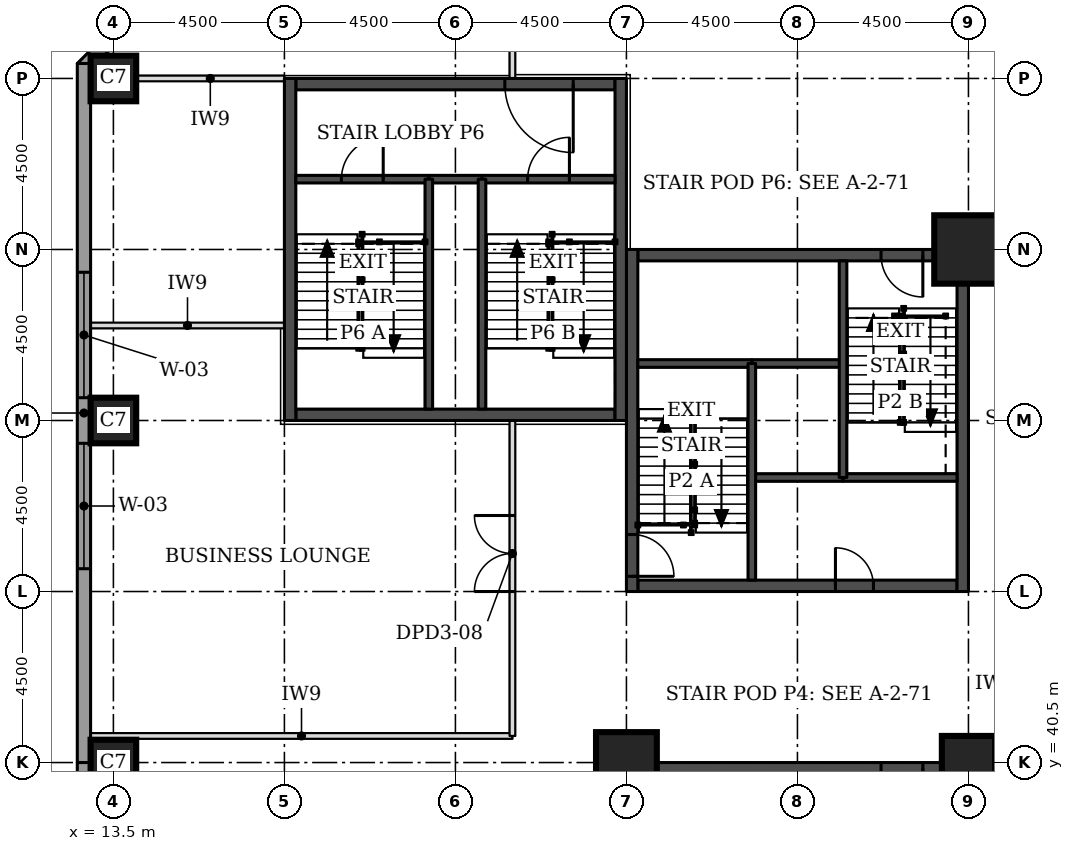
"""IFC4 building model, lengths in metres.
Left out: names, types, materials, properties, quantities, classifications, styles, units other than length and angle.
Written with IfcOpenShell. Run it as: python <this file> out.ifc"""

import sys

from ifc_helpers import new_model, si_unit, direction, frame, frame_2d, origin, origin_2d, place, context, subcontext, project, spatial, rectangle, extrude, element, fill, save


model = new_model("IFC4")
c1 = context("Model", 3, precision=1e-05, world=origin(), true_north=direction((0.0, 1.0)))
c2 = subcontext(c1, "Body", "Model", "MODEL_VIEW")
j1 = project(units=[si_unit("LENGTHUNIT", "METRE"), si_unit("PLANEANGLEUNIT", "RADIAN")], contexts=[c1])
p1 = place(None, origin())
s1 = spatial("IfcSite", under=j1, at=p1, CompositionType="ELEMENT")
p2 = place(p1, origin())
s2 = spatial("IfcBuilding", under=s1, at=p2, CompositionType="ELEMENT")
p3 = place(p2, frame((0.0, 0.0, 18.5)))
s3 = spatial("IfcBuildingStorey", under=s2, at=p3, CompositionType="ELEMENT", Elevation=18.5)
p4 = place(p3, frame((13.5, 40.5, 0.0), z_axis=(0.0, 0.0, 1.0), x_axis=(1.0, 0.0, 0.0)))
e1 = element("IfcColumn", 1, at=p4, inside=s3, PredefinedType="COLUMN", context=c2, shape_type="SweptSolid", body=[
    extrude(rectangle(XDim=1.2, YDim=1.2, at=origin_2d()), origin(), (0.0, 0.0, 1.0), 4.6),
])
p5 = place(p3, frame((27.0, 40.5, 0.0), z_axis=(0.0, 0.0, 1.0), x_axis=(1.0, 0.0, 0.0)))
e2 = element("IfcColumn", 2, at=p5, inside=s3, PredefinedType="COLUMN", context=c2, shape_type="SweptSolid", body=[
    extrude(rectangle(XDim=1.6, YDim=1.6, at=origin_2d()), origin(), (0.0, 0.0, 1.0), 4.6),
])
p6 = place(p3, frame((36.0, 40.5, 0.0), z_axis=(0.0, 0.0, 1.0), x_axis=(1.0, 0.0, 0.0)))
e3 = element("IfcColumn", 3, at=p6, inside=s3, PredefinedType="COLUMN", context=c2, shape_type="SweptSolid", body=[
    extrude(rectangle(XDim=1.4, YDim=1.4, at=origin_2d()), origin(), (0.0, 0.0, 1.0), 4.6),
])
p7 = place(p3, frame((13.5, 49.5, 0.0), z_axis=(0.0, 0.0, 1.0), x_axis=(1.0, 0.0, 0.0)))
e4 = element("IfcColumn", 4, at=p7, inside=s3, PredefinedType="COLUMN", context=c2, shape_type="SweptSolid", body=[
    extrude(rectangle(XDim=1.2, YDim=1.2, at=origin_2d()), origin(), (0.0, 0.0, 1.0), 4.6),
])
p8 = place(p3, frame((36.0, 54.0, 0.0), z_axis=(0.0, 0.0, 1.0), x_axis=(1.0, 0.0, 0.0)))
e5 = element("IfcColumn", 5, at=p8, inside=s3, PredefinedType="COLUMN", context=c2, shape_type="SweptSolid", body=[
    extrude(rectangle(XDim=1.8, YDim=1.8, at=origin_2d()), origin(), (0.0, 0.0, 1.0), 4.6),
])
p9 = place(p3, frame((13.5, 58.5, 0.0), z_axis=(0.0, 0.0, 1.0), x_axis=(1.0, 0.0, 0.0)))
e6 = element("IfcColumn", 6, at=p9, inside=s3, PredefinedType="COLUMN", context=c2, shape_type="SweptSolid", body=[
    extrude(rectangle(XDim=1.2, YDim=1.2, at=origin_2d()), origin(), (0.0, 0.0, 1.0), 4.6),
])
p10 = place(p3, frame((27.3, 45.15, 0.0), z_axis=(0.0, 0.0, 1.0), x_axis=(1.0, 0.0, 0.0)))
e7 = element("IfcWall", 7, at=p10, inside=s3, PredefinedType="SHEAR", context=c2, shape_type="SweptSolid", body=[
    extrude(rectangle(XDim=8.4, YDim=0.3, at=frame_2d((4.2, 0.0))), origin(), (0.0, 0.0, 1.0), 4.6),
])
p11 = place(p10, frame((5.2, 0.0, 0.0)))
e8 = element("IfcOpeningElement", 8, at=p11, cuts=e7, PredefinedType="OPENING", context=c2, shape_type="SweptSolid", body=[
    extrude(rectangle(XDim=1.0, YDim=2.1, at=frame_2d((0.5, 1.05))), frame((0.0, 0.16, 0.0), z_axis=(0.0, -1.0, 0.0), x_axis=(1.0, 0.0, 0.0)), (0.0, 0.0, 1.0), 0.32),
])
p12 = place(p3, frame((27.3, 53.85, 0.0), z_axis=(0.0, 0.0, 1.0), x_axis=(1.0, 0.0, 0.0)))
e9 = element("IfcWall", 9, at=p12, inside=s3, PredefinedType="SHEAR", context=c2, shape_type="SweptSolid", body=[
    extrude(rectangle(XDim=8.4, YDim=0.3, at=frame_2d((4.2, 0.0))), origin(), (0.0, 0.0, 1.0), 4.6),
])
p13 = place(p12, frame((6.4, 0.0, 0.0)))
e10 = element("IfcOpeningElement", 10, at=p13, cuts=e9, PredefinedType="OPENING", context=c2, shape_type="SweptSolid", body=[
    extrude(rectangle(XDim=1.1, YDim=2.1, at=frame_2d((0.55, 1.05))), frame((0.0, 0.16, 0.0), z_axis=(0.0, -1.0, 0.0), x_axis=(1.0, 0.0, 0.0)), (0.0, 0.0, 1.0), 0.32),
])
p14 = place(p3, frame((27.15, 45.0, 0.0), z_axis=(0.0, 0.0, 1.0), x_axis=(0.0, 1.0, 0.0)))
e11 = element("IfcWall", 11, at=p14, inside=s3, PredefinedType="SHEAR", context=c2, shape_type="SweptSolid", body=[
    extrude(rectangle(XDim=9.0, YDim=0.3, at=frame_2d((4.5, 0.0))), origin(), (0.0, 0.0, 1.0), 4.6),
])
p15 = place(p14, frame((0.4, 0.0, 0.0)))
e12 = element("IfcOpeningElement", 12, at=p15, cuts=e11, PredefinedType="OPENING", context=c2, shape_type="SweptSolid", body=[
    extrude(rectangle(XDim=1.1, YDim=2.1, at=frame_2d((0.55, 1.05))), frame((0.0, 0.16, 0.0), z_axis=(0.0, -1.0, 0.0), x_axis=(1.0, 0.0, 0.0)), (0.0, 0.0, 1.0), 0.32),
])
p16 = place(p3, frame((35.85, 45.0, 0.0), z_axis=(0.0, 0.0, 1.0), x_axis=(0.0, 1.0, 0.0)))
e13 = element("IfcWall", 13, at=p16, inside=s3, PredefinedType="SHEAR", context=c2, shape_type="SweptSolid", body=[
    extrude(rectangle(XDim=9.0, YDim=0.3, at=frame_2d((4.5, 0.0))), origin(), (0.0, 0.0, 1.0), 4.6),
])
p17 = place(p3, frame((27.3, 40.35, 0.0), z_axis=(0.0, 0.0, 1.0), x_axis=(1.0, 0.0, 0.0)))
e14 = element("IfcWall", 14, at=p17, inside=s3, PredefinedType="SHEAR", context=c2, shape_type="SweptSolid", body=[
    extrude(rectangle(XDim=8.4, YDim=0.3, at=frame_2d((4.2, 0.0))), origin(), (0.0, 0.0, 1.0), 4.6),
])
p18 = place(p17, frame((6.4, 0.0, 0.0)))
e15 = element("IfcOpeningElement", 15, at=p18, cuts=e14, PredefinedType="OPENING", context=c2, shape_type="SweptSolid", body=[
    extrude(rectangle(XDim=1.1, YDim=2.1, at=frame_2d((0.55, 1.05))), frame((0.0, 0.16, 0.0), z_axis=(0.0, -1.0, 0.0), x_axis=(1.0, 0.0, 0.0)), (0.0, 0.0, 1.0), 0.32),
])
p19 = place(p3, frame((27.15, 31.5, 0.0), z_axis=(0.0, 0.0, 1.0), x_axis=(0.0, 1.0, 0.0)))
e16 = element("IfcWall", 16, at=p19, inside=s3, PredefinedType="SHEAR", context=c2, shape_type="SweptSolid", body=[
    extrude(rectangle(XDim=9.0, YDim=0.3, at=frame_2d((4.5, 0.0))), origin(), (0.0, 0.0, 1.0), 4.6),
])
p20 = place(p19, frame((0.4, 0.0, 0.0)))
e17 = element("IfcOpeningElement", 17, at=p20, cuts=e16, PredefinedType="OPENING", context=c2, shape_type="SweptSolid", body=[
    extrude(rectangle(XDim=1.1, YDim=2.1, at=frame_2d((0.55, 1.05))), frame((0.0, 0.16, 0.0), z_axis=(0.0, -1.0, 0.0), x_axis=(1.0, 0.0, 0.0)), (0.0, 0.0, 1.0), 0.32),
])
p21 = place(p3, frame((35.85, 31.5, 0.0), z_axis=(0.0, 0.0, 1.0), x_axis=(0.0, 1.0, 0.0)))
e18 = element("IfcWall", 18, at=p21, inside=s3, PredefinedType="SHEAR", context=c2, shape_type="SweptSolid", body=[
    extrude(rectangle(XDim=9.0, YDim=0.3, at=frame_2d((4.5, 0.0))), origin(), (0.0, 0.0, 1.0), 4.6),
])
p22 = place(p3, frame((18.3, 49.65, 0.0), z_axis=(0.0, 0.0, 1.0), x_axis=(1.0, 0.0, 0.0)))
e19 = element("IfcWall", 19, at=p22, inside=s3, PredefinedType="SHEAR", context=c2, shape_type="SweptSolid", body=[
    extrude(rectangle(XDim=8.4, YDim=0.3, at=frame_2d((4.2, 0.0))), origin(), (0.0, 0.0, 1.0), 4.6),
])
p23 = place(p3, frame((18.3, 58.35, 0.0), z_axis=(0.0, 0.0, 1.0), x_axis=(1.0, 0.0, 0.0)))
e20 = element("IfcWall", 20, at=p23, inside=s3, PredefinedType="SHEAR", context=c2, shape_type="SweptSolid", body=[
    extrude(rectangle(XDim=8.4, YDim=0.3, at=frame_2d((4.2, 0.0))), origin(), (0.0, 0.0, 1.0), 4.6),
])
p24 = place(p23, frame((5.5, 0.0, 0.0)))
e21 = element("IfcOpeningElement", 21, at=p24, cuts=e20, PredefinedType="OPENING", context=c2, shape_type="SweptSolid", body=[
    extrude(rectangle(XDim=1.8, YDim=2.1, at=frame_2d((0.9, 1.05))), frame((0.0, 0.16, 0.0), z_axis=(0.0, -1.0, 0.0), x_axis=(1.0, 0.0, 0.0)), (0.0, 0.0, 1.0), 0.32),
])
for number, where, z_axis, x_axis in (
    (22, (18.15, 49.5, 0.0), (0.0, 0.0, 1.0), (0.0, 1.0, 0.0)),
    (23, (26.85, 49.5, 0.0), (0.0, 0.0, 1.0), (0.0, 1.0, 0.0)),
):
    element("IfcWall", number, at=place(p3, frame(where, z_axis=z_axis, x_axis=x_axis)), inside=s3, PredefinedType="SHEAR", context=c2, shape_type="SweptSolid", body=[
        extrude(rectangle(XDim=9.0, YDim=0.3, at=frame_2d((4.5, 0.0))), origin(), (0.0, 0.0, 1.0), 4.6),
    ])
p25 = place(p3, frame((17.73, 63.826, 0.0), z_axis=(0.0, 0.0, 1.0), x_axis=(-0.707106781187, -0.707106781187, 0.0)))
e24 = element("IfcWall", 24, at=p25, inside=s3, PredefinedType="STANDARD", context=c2, shape_type="SweptSolid", body=[
    extrude(rectangle(XDim=7.151, YDim=0.35, at=frame_2d((3.576, 0.0))), origin(), (0.0, 0.0, 1.0), 4.355),
])
p26 = place(p25, frame((1.926, 0.0, 0.9)))
e25 = element("IfcOpeningElement", 25, at=p26, cuts=e24, PredefinedType="OPENING", context=c2, shape_type="SweptSolid", body=[
    extrude(rectangle(XDim=3.3, YDim=2.7, at=frame_2d((1.65, 1.35))), frame((0.0, 0.185, 0.0), z_axis=(0.0, -1.0, 0.0), x_axis=(1.0, 0.0, 0.0)), (0.0, 0.0, 1.0), 0.37),
])
p27 = place(p3, frame((12.725, 58.894, 0.0), z_axis=(0.0, 0.0, 1.0), x_axis=(0.0, -1.0, 0.0)))
e26 = element("IfcWall", 26, at=p27, inside=s3, PredefinedType="STANDARD", context=c2, shape_type="SweptSolid", body=[
    extrude(rectangle(XDim=18.394, YDim=0.35, at=frame_2d((9.197, 0.0))), origin(), (0.0, 0.0, 1.0), 4.355),
])
p28 = place(p27, frame((5.493, 0.0, 0.9)))
e27 = element("IfcOpeningElement", 27, at=p28, cuts=e26, PredefinedType="OPENING", context=c2, shape_type="SweptSolid", body=[
    extrude(rectangle(XDim=3.3, YDim=2.7, at=frame_2d((1.65, 1.35))), frame((0.0, 0.185, 0.0), z_axis=(0.0, -1.0, 0.0), x_axis=(1.0, 0.0, 0.0)), (0.0, 0.0, 1.0), 0.37),
])
p29 = place(p27, frame((9.993, 0.0, 0.9)))
e28 = element("IfcOpeningElement", 28, at=p29, cuts=e26, PredefinedType="OPENING", context=c2, shape_type="SweptSolid", body=[
    extrude(rectangle(XDim=3.3, YDim=2.7, at=frame_2d((1.65, 1.35))), frame((0.0, 0.185, 0.0), z_axis=(0.0, -1.0, 0.0), x_axis=(1.0, 0.0, 0.0)), (0.0, 0.0, 1.0), 0.37),
])
p30 = place(p3, frame((12.725, 40.5, 0.0), z_axis=(0.0, 0.0, 1.0), x_axis=(0.0, -1.0, 0.0)))
e29 = element("IfcWall", 29, at=p30, inside=s3, PredefinedType="STANDARD", context=c2, shape_type="SweptSolid", body=[
    extrude(rectangle(XDim=18.394, YDim=0.35, at=frame_2d((9.197, 0.0))), origin(), (0.0, 0.0, 1.0), 4.355),
])
p31 = place(p30, frame((5.1, 0.0, 0.9)))
e30 = element("IfcOpeningElement", 30, at=p31, cuts=e29, PredefinedType="OPENING", context=c2, shape_type="SweptSolid", body=[
    extrude(rectangle(XDim=3.3, YDim=2.7, at=frame_2d((1.65, 1.35))), frame((0.0, 0.185, 0.0), z_axis=(0.0, -1.0, 0.0), x_axis=(1.0, 0.0, 0.0)), (0.0, 0.0, 1.0), 0.37),
])
p32 = place(p30, frame((9.6, 0.0, 0.9)))
e31 = element("IfcOpeningElement", 31, at=p32, cuts=e29, PredefinedType="OPENING", context=c2, shape_type="SweptSolid", body=[
    extrude(rectangle(XDim=3.3, YDim=2.7, at=frame_2d((1.65, 1.35))), frame((0.0, 0.185, 0.0), z_axis=(0.0, -1.0, 0.0), x_axis=(1.0, 0.0, 0.0)), (0.0, 0.0, 1.0), 0.37),
])
p33 = place(p3, frame((12.9, 41.2, 0.0), z_axis=(0.0, 0.0, 1.0), x_axis=(1.0, 0.0, 0.0)))
e32 = element("IfcWall", 32, at=p33, inside=s3, PredefinedType="PARTITIONING", context=c2, shape_type="SweptSolid", body=[
    extrude(rectangle(XDim=11.1, YDim=0.15, at=frame_2d((5.55, 0.0))), origin(), (0.0, 0.0, 1.0), 4.38),
])
p34 = place(p3, frame((24.0, 41.2, 0.0), z_axis=(0.0, 0.0, 1.0), x_axis=(0.0, 1.0, 0.0)))
e33 = element("IfcWall", 33, at=p34, inside=s3, PredefinedType="PARTITIONING", context=c2, shape_type="SweptSolid", body=[
    extrude(rectangle(XDim=8.3, YDim=0.15, at=frame_2d((4.15, 0.0))), origin(), (0.0, 0.0, 1.0), 4.38),
])
p35 = place(p34, frame((3.8, 0.0, 0.0)))
e34 = element("IfcOpeningElement", 34, at=p35, cuts=e33, PredefinedType="OPENING", context=c2, shape_type="SweptSolid", body=[
    extrude(rectangle(XDim=2.0, YDim=2.1, at=frame_2d((1.0, 1.05))), frame((0.0, 0.085, 0.0), z_axis=(0.0, -1.0, 0.0), x_axis=(1.0, 0.0, 0.0)), (0.0, 0.0, 1.0), 0.17),
])
p36 = place(p3, frame((12.9, 52.0, 0.0), z_axis=(0.0, 0.0, 1.0), x_axis=(1.0, 0.0, 0.0)))
e35 = element("IfcWall", 35, at=p36, inside=s3, PredefinedType="PARTITIONING", context=c2, shape_type="SweptSolid", body=[
    extrude(rectangle(XDim=5.1, YDim=0.15, at=frame_2d((2.55, 0.0))), origin(), (0.0, 0.0, 1.0), 4.38),
])
p37 = place(p3, frame((14.1, 58.5, 0.0), z_axis=(0.0, 0.0, 1.0), x_axis=(1.0, 0.0, 0.0)))
e36 = element("IfcWall", 36, at=p37, inside=s3, PredefinedType="PARTITIONING", context=c2, shape_type="SweptSolid", body=[
    extrude(rectangle(XDim=3.9, YDim=0.15, at=frame_2d((1.95, 0.0))), origin(), (0.0, 0.0, 1.0), 4.38),
])
p38 = place(p3, frame((24.0, 58.5, 0.0), z_axis=(0.0, 0.0, 1.0), x_axis=(0.0, 1.0, 0.0)))
e37 = element("IfcWall", 37, at=p38, inside=s3, PredefinedType="PARTITIONING", context=c2, shape_type="SweptSolid", body=[
    extrude(rectangle(XDim=5.1, YDim=0.15, at=frame_2d((2.55, 0.0))), origin(), (0.0, 0.0, 1.0), 4.38),
])
p39 = place(p38, frame((2.0, 0.0, 0.0)))
e38 = element("IfcOpeningElement", 38, at=p39, cuts=e37, PredefinedType="OPENING", context=c2, shape_type="SweptSolid", body=[
    extrude(rectangle(XDim=1.0, YDim=2.1, at=frame_2d((0.5, 1.05))), frame((0.0, 0.085, 0.0), z_axis=(0.0, -1.0, 0.0), x_axis=(1.0, 0.0, 0.0)), (0.0, 0.0, 1.0), 0.17),
])
p40 = place(p3, frame((30.3, 48.0, 0.0), z_axis=(0.0, 0.0, 1.0), x_axis=(1.0, 0.0, 0.0)))
e39 = element("IfcWall", 39, at=p40, inside=s3, PredefinedType="SOLIDWALL", context=c2, shape_type="SweptSolid", body=[
    extrude(rectangle(XDim=2.4, YDim=0.2, at=frame_2d((1.2, 0.0))), origin(), (0.0, 0.0, 1.0), 4.38),
])
p41 = place(p3, frame((32.7, 48.0, 0.0), z_axis=(0.0, 0.0, 1.0), x_axis=(1.0, 0.0, 0.0)))
e40 = element("IfcWall", 40, at=p41, inside=s3, PredefinedType="SOLIDWALL", context=c2, shape_type="SweptSolid", body=[
    extrude(rectangle(XDim=3.0, YDim=0.2, at=frame_2d((1.5, 0.0))), origin(), (0.0, 0.0, 1.0), 4.38),
])
p42 = place(p3, frame((30.3, 51.0, 0.0), z_axis=(0.0, 0.0, 1.0), x_axis=(1.0, 0.0, 0.0)))
e41 = element("IfcWall", 41, at=p42, inside=s3, PredefinedType="SOLIDWALL", context=c2, shape_type="SweptSolid", body=[
    extrude(rectangle(XDim=2.4, YDim=0.2, at=frame_2d((1.2, 0.0))), origin(), (0.0, 0.0, 1.0), 4.6),
])
p43 = place(p3, frame((27.3, 51.0, 0.0), z_axis=(0.0, 0.0, 1.0), x_axis=(1.0, 0.0, 0.0)))
e42 = element("IfcWall", 42, at=p43, inside=s3, PredefinedType="SOLIDWALL", context=c2, shape_type="SweptSolid", body=[
    extrude(rectangle(XDim=3.0, YDim=0.2, at=frame_2d((1.5, 0.0))), origin(), (0.0, 0.0, 1.0), 4.38),
])
for number, where, z_axis, x_axis in (
    (43, (30.3, 45.3, 0.0), (0.0, 0.0, 1.0), (0.0, 1.0, 0.0)),
    (44, (32.7, 48.0, 0.0), (0.0, 0.0, 1.0), (0.0, 1.0, 0.0)),
):
    element("IfcWall", number, at=place(p3, frame(where, z_axis=z_axis, x_axis=x_axis)), inside=s3, PredefinedType="SOLIDWALL", context=c2, shape_type="SweptSolid", body=[
        extrude(rectangle(XDim=5.7, YDim=0.2, at=frame_2d((2.85, 0.0))), origin(), (0.0, 0.0, 1.0), 4.38),
    ])
p44 = place(p3, frame((21.8, 55.85, 0.0), z_axis=(0.0, 0.0, 1.0), x_axis=(1.0, 0.0, 0.0)))
e45 = element("IfcWall", 45, at=p44, inside=s3, PredefinedType="SOLIDWALL", context=c2, shape_type="SweptSolid", body=[
    extrude(rectangle(XDim=1.4, YDim=0.2, at=frame_2d((0.7, 0.0))), origin(), (0.0, 0.0, 1.0), 4.38),
])
p45 = place(p3, frame((18.3, 55.85, 0.0), z_axis=(0.0, 0.0, 1.0), x_axis=(1.0, 0.0, 0.0)))
e46 = element("IfcWall", 46, at=p45, inside=s3, PredefinedType="SOLIDWALL", context=c2, shape_type="SweptSolid", body=[
    extrude(rectangle(XDim=3.5, YDim=0.2, at=frame_2d((1.75, 0.0))), origin(), (0.0, 0.0, 1.0), 4.38),
])
p46 = place(p45, frame((1.2, 0.0, 0.0)))
e47 = element("IfcOpeningElement", 47, at=p46, cuts=e46, PredefinedType="OPENING", context=c2, shape_type="SweptSolid", body=[
    extrude(rectangle(XDim=1.1, YDim=2.1, at=frame_2d((0.55, 1.05))), frame((0.0, 0.11, 0.0), z_axis=(0.0, -1.0, 0.0), x_axis=(1.0, 0.0, 0.0)), (0.0, 0.0, 1.0), 0.22),
])
p47 = place(p3, frame((23.2, 55.85, 0.0), z_axis=(0.0, 0.0, 1.0), x_axis=(1.0, 0.0, 0.0)))
e48 = element("IfcWall", 48, at=p47, inside=s3, PredefinedType="SOLIDWALL", context=c2, shape_type="SweptSolid", body=[
    extrude(rectangle(XDim=3.5, YDim=0.2, at=frame_2d((1.75, 0.0))), origin(), (0.0, 0.0, 1.0), 4.38),
])
p48 = place(p47, frame((1.2, 0.0, 0.0)))
e49 = element("IfcOpeningElement", 49, at=p48, cuts=e48, PredefinedType="OPENING", context=c2, shape_type="SweptSolid", body=[
    extrude(rectangle(XDim=1.1, YDim=2.1, at=frame_2d((0.55, 1.05))), frame((0.0, 0.11, 0.0), z_axis=(0.0, -1.0, 0.0), x_axis=(1.0, 0.0, 0.0)), (0.0, 0.0, 1.0), 0.22),
])
for number, where, z_axis, x_axis in (
    (50, (21.8, 49.8, 0.0), (0.0, 0.0, 1.0), (0.0, 1.0, 0.0)),
    (51, (23.2, 49.8, 0.0), (0.0, 0.0, 1.0), (0.0, 1.0, 0.0)),
):
    element("IfcWall", number, at=place(p3, frame(where, z_axis=z_axis, x_axis=x_axis)), inside=s3, PredefinedType="SOLIDWALL", context=c2, shape_type="SweptSolid", body=[
        extrude(rectangle(XDim=6.05, YDim=0.2, at=frame_2d((3.025, 0.0))), origin(), (0.0, 0.0, 1.0), 4.38),
    ])
p49 = place(p28, origin())
e52 = element("IfcWindow", 52, at=p49, inside=s3, PartitioningType="SINGLE_PANEL", PredefinedType="WINDOW", context=c2, shape_type="SweptSolid", body=[
    extrude(rectangle(XDim=3.3, YDim=2.7, at=frame_2d((1.65, 1.35))), frame((0.0, 0.085, 0.0), z_axis=(0.0, -1.0, 0.0), x_axis=(1.0, 0.0, 0.0)), (0.0, 0.0, 1.0), 0.06),
])
fill(e27, e52)
p50 = place(p29, origin())
e53 = element("IfcWindow", 53, at=p50, inside=s3, PartitioningType="SINGLE_PANEL", PredefinedType="WINDOW", context=c2, shape_type="SweptSolid", body=[
    extrude(rectangle(XDim=3.3, YDim=2.7, at=frame_2d((1.65, 1.35))), frame((0.0, 0.085, 0.0), z_axis=(0.0, -1.0, 0.0), x_axis=(1.0, 0.0, 0.0)), (0.0, 0.0, 1.0), 0.06),
])
fill(e28, e53)
p51 = place(p35, origin())
e54 = element("IfcDoor", 54, at=p51, inside=s3, OperationType="DOUBLE_DOOR_SINGLE_SWING", PredefinedType="DOOR", context=c2, shape_type="SweptSolid", body=[
    extrude(rectangle(XDim=2.0, YDim=2.1, at=frame_2d((1.0, 1.05))), frame((0.0, 0.025, 0.0), z_axis=(0.0, -1.0, 0.0), x_axis=(1.0, 0.0, 0.0)), (0.0, 0.0, 1.0), 0.05),
])
fill(e34, e54)
p52 = place(p15, frame((1.1, 0.0, 0.0), z_axis=(0.0, 0.0, 1.0), x_axis=(-1.0, 0.0, 0.0)))
e55 = element("IfcDoor", 55, at=p52, inside=s3, OperationType="SINGLE_SWING_RIGHT", PredefinedType="DOOR", context=c2, shape_type="SweptSolid", body=[
    extrude(rectangle(XDim=1.1, YDim=2.1, at=frame_2d((0.55, 1.05))), frame((0.0, 0.025, 0.0), z_axis=(0.0, -1.0, 0.0), x_axis=(1.0, 0.0, 0.0)), (0.0, 0.0, 1.0), 0.05),
])
fill(e12, e55)
p53 = place(p13, frame((1.1, 0.0, 0.0), z_axis=(0.0, 0.0, 1.0), x_axis=(-1.0, 0.0, 0.0)))
e56 = element("IfcDoor", 56, at=p53, inside=s3, OperationType="SINGLE_SWING_LEFT", PredefinedType="DOOR", context=c2, shape_type="SweptSolid", body=[
    extrude(rectangle(XDim=1.1, YDim=2.1, at=frame_2d((0.55, 1.05))), frame((0.0, 0.025, 0.0), z_axis=(0.0, -1.0, 0.0), x_axis=(1.0, 0.0, 0.0)), (0.0, 0.0, 1.0), 0.05),
])
fill(e10, e56)
p54 = place(p11, origin())
e57 = element("IfcDoor", 57, at=p54, inside=s3, OperationType="SINGLE_SWING_LEFT", PredefinedType="DOOR", context=c2, shape_type="SweptSolid", body=[
    extrude(rectangle(XDim=1.0, YDim=2.1, at=frame_2d((0.5, 1.05))), frame((0.0, 0.025, 0.0), z_axis=(0.0, -1.0, 0.0), x_axis=(1.0, 0.0, 0.0)), (0.0, 0.0, 1.0), 0.05),
])
fill(e8, e57)
p55 = place(p18, frame((1.1, 0.0, 0.0), z_axis=(0.0, 0.0, 1.0), x_axis=(-1.0, 0.0, 0.0)))
e58 = element("IfcDoor", 58, at=p55, inside=s3, OperationType="SINGLE_SWING_LEFT", PredefinedType="DOOR", context=c2, shape_type="SweptSolid", body=[
    extrude(rectangle(XDim=1.1, YDim=2.1, at=frame_2d((0.55, 1.05))), frame((0.0, 0.025, 0.0), z_axis=(0.0, -1.0, 0.0), x_axis=(1.0, 0.0, 0.0)), (0.0, 0.0, 1.0), 0.05),
])
fill(e15, e58)
p56 = place(p46, origin())
e59 = element("IfcDoor", 59, at=p56, inside=s3, OperationType="SINGLE_SWING_RIGHT", PredefinedType="DOOR", context=c2, shape_type="SweptSolid", body=[
    extrude(rectangle(XDim=1.1, YDim=2.1, at=frame_2d((0.55, 1.05))), frame((0.0, 0.025, 0.0), z_axis=(0.0, -1.0, 0.0), x_axis=(1.0, 0.0, 0.0)), (0.0, 0.0, 1.0), 0.05),
])
fill(e47, e59)
p57 = place(p48, origin())
e60 = element("IfcDoor", 60, at=p57, inside=s3, OperationType="SINGLE_SWING_RIGHT", PredefinedType="DOOR", context=c2, shape_type="SweptSolid", body=[
    extrude(rectangle(XDim=1.1, YDim=2.1, at=frame_2d((0.55, 1.05))), frame((0.0, 0.025, 0.0), z_axis=(0.0, -1.0, 0.0), x_axis=(1.0, 0.0, 0.0)), (0.0, 0.0, 1.0), 0.05),
])
fill(e49, e60)
p58 = place(p24, frame((1.8, 0.0, 0.0), z_axis=(0.0, 0.0, 1.0), x_axis=(-1.0, 0.0, 0.0)))
e61 = element("IfcDoor", 61, at=p58, inside=s3, OperationType="SINGLE_SWING_LEFT", PredefinedType="DOOR", context=c2, shape_type="SweptSolid", body=[
    extrude(rectangle(XDim=1.8, YDim=2.1, at=frame_2d((0.9, 1.05))), frame((0.0, 0.025, 0.0), z_axis=(0.0, -1.0, 0.0), x_axis=(1.0, 0.0, 0.0)), (0.0, 0.0, 1.0), 0.05),
])
fill(e21, e61)
save(model, sys.argv[1])
